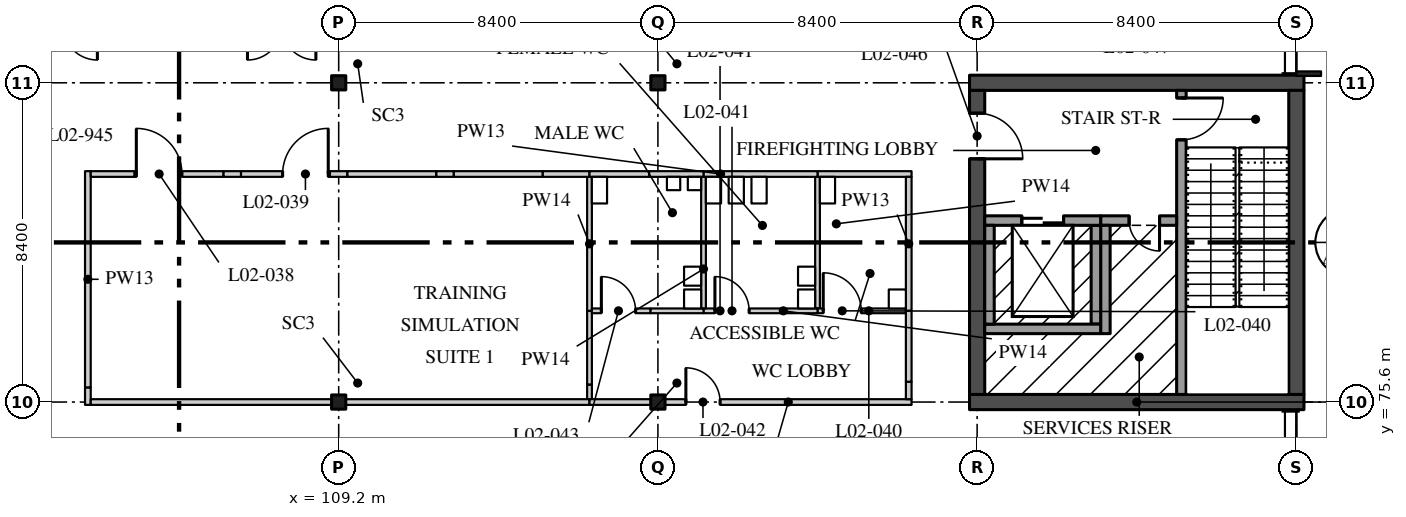
"""IFC4 building model, lengths in metres.
Left out: names, types, materials, properties, quantities, classifications, styles, units other than length and angle.
Written with IfcOpenShell. Run it as: python <this file> out.ifc"""

import sys

from ifc_helpers import new_model, si_unit, direction, frame, frame_2d, origin, origin_2d, place, context, subcontext, project, spatial, rectangle, i_section, extrude, element, fill, save


model = new_model("IFC4")
c1 = context("Model", 3, precision=1e-05, world=origin(), true_north=direction((0.0, 1.0)))
c2 = subcontext(c1, "Body", "Model", "MODEL_VIEW")
j1 = project(units=[si_unit("LENGTHUNIT", "METRE"), si_unit("PLANEANGLEUNIT", "RADIAN")], contexts=[c1])
p1 = place(None, origin())
s1 = spatial("IfcSite", under=j1, at=p1, CompositionType="ELEMENT")
p2 = place(p1, origin())
s2 = spatial("IfcBuilding", under=s1, at=p2, CompositionType="ELEMENT")
p3 = place(p2, frame((0.0, 0.0, 9.9)))
s3 = spatial("IfcBuildingStorey", under=s2, at=p3, CompositionType="ELEMENT", Elevation=9.9)
for number, where, z_axis, x_axis in (
    (1, (109.2, 75.6, 0.0), (0.0, 0.0, 1.0), (1.0, 0.0, 0.0)),
    (2, (109.2, 84.0, 0.0), (0.0, 0.0, 1.0), (1.0, 0.0, 0.0)),
    (3, (117.6, 75.6, 0.0), (0.0, 0.0, 1.0), (1.0, 0.0, 0.0)),
    (4, (117.6, 84.0, 0.0), (0.0, 0.0, 1.0), (1.0, 0.0, 0.0)),
):
    element("IfcColumn", number, at=place(p3, frame(where, z_axis=z_axis, x_axis=x_axis)), inside=s3, PredefinedType="COLUMN", context=c2, shape_type="SweptSolid", body=[
        extrude(i_section(OverallWidth=0.373, OverallDepth=0.373, WebThickness=0.016, FlangeThickness=0.026, FilletRadius=0.015, at=origin_2d()), origin(), (0.0, 0.0, 1.0), 4.37),
    ])
for number, where, z_axis, x_axis in (
    (5, (125.8, 75.6, 0.0), (0.0, 0.0, 1.0), (1.0, 0.0, 0.0)),
    (6, (125.8, 84.0, 0.0), (0.0, 0.0, 1.0), (1.0, 0.0, 0.0)),
):
    element("IfcWall", number, at=place(p3, frame(where, z_axis=z_axis, x_axis=x_axis)), inside=s3, PredefinedType="SHEAR", context=c2, shape_type="SweptSolid", body=[
        extrude(rectangle(XDim=8.8, YDim=0.4, at=frame_2d((4.4, 0.0))), origin(), (0.0, 0.0, 1.0), 4.37),
    ])
p4 = place(p3, frame((126.0, 75.8, 0.0), z_axis=(0.0, 0.0, 1.0), x_axis=(0.0, 1.0, 0.0)))
e7 = element("IfcWall", 7, at=p4, inside=s3, PredefinedType="SHEAR", context=c2, shape_type="SweptSolid", body=[
    extrude(rectangle(XDim=8.0, YDim=0.4, at=frame_2d((4.0, 0.0))), origin(), (0.0, 0.0, 1.0), 4.37),
])
p5 = place(p4, frame((6.2, 0.0, 0.0)))
e8 = element("IfcOpeningElement", 8, at=p5, cuts=e7, PredefinedType="OPENING", context=c2, shape_type="SweptSolid", body=[
    extrude(rectangle(XDim=1.2, YDim=2.1, at=frame_2d((0.6, 1.05))), frame((0.0, 0.21, 0.0), z_axis=(0.0, -1.0, 0.0), x_axis=(1.0, 0.0, 0.0)), (0.0, 0.0, 1.0), 0.42),
])
p6 = place(p3, frame((134.4, 75.8, 0.0), z_axis=(0.0, 0.0, 1.0), x_axis=(0.0, 1.0, 0.0)))
e9 = element("IfcWall", 9, at=p6, inside=s3, PredefinedType="SHEAR", context=c2, shape_type="SweptSolid", body=[
    extrude(rectangle(XDim=8.0, YDim=0.4, at=frame_2d((4.0, 0.0))), origin(), (0.0, 0.0, 1.0), 4.37),
])
p7 = place(p3, frame((131.375, 83.8, 0.0), z_axis=(0.0, 0.0, 1.0), x_axis=(0.0, -1.0, 0.0)))
e10 = element("IfcWall", 10, at=p7, inside=s3, PredefinedType="SOLIDWALL", context=c2, shape_type="SweptSolid", body=[
    extrude(rectangle(XDim=8.0, YDim=0.25, at=frame_2d((4.0, 0.0))), origin(), (0.0, 0.0, 1.0), 4.37),
])
p8 = place(p7, frame((0.2, 0.0, 0.0)))
e11 = element("IfcOpeningElement", 11, at=p8, cuts=e10, PredefinedType="OPENING", context=c2, shape_type="SweptSolid", body=[
    extrude(rectangle(XDim=1.1, YDim=2.1, at=frame_2d((0.55, 1.05))), frame((0.0, 0.135, 0.0), z_axis=(0.0, -1.0, 0.0), x_axis=(1.0, 0.0, 0.0)), (0.0, 0.0, 1.0), 0.27),
])
p9 = place(p3, frame((131.25, 80.375, 0.0), z_axis=(0.0, 0.0, 1.0), x_axis=(-1.0, 0.0, 0.0)))
e12 = element("IfcWall", 12, at=p9, inside=s3, PredefinedType="SOLIDWALL", context=c2, shape_type="SweptSolid", body=[
    extrude(rectangle(XDim=2.0, YDim=0.25, at=frame_2d((1.0, 0.0))), origin(), (0.0, 0.0, 1.0), 4.37),
])
p10 = place(p9, frame((0.45, 0.0, 0.0)))
e13 = element("IfcOpeningElement", 13, at=p10, cuts=e12, PredefinedType="OPENING", context=c2, shape_type="SweptSolid", body=[
    extrude(rectangle(XDim=0.8, YDim=2.1, at=frame_2d((0.4, 1.05))), frame((0.0, 0.135, 0.0), z_axis=(0.0, -1.0, 0.0), x_axis=(1.0, 0.0, 0.0)), (0.0, 0.0, 1.0), 0.27),
])
p11 = place(p3, frame((129.375, 80.25, 0.0), z_axis=(0.0, 0.0, 1.0), x_axis=(0.0, -1.0, 0.0)))
e14 = element("IfcWall", 14, at=p11, inside=s3, PredefinedType="SOLIDWALL", context=c2, shape_type="SweptSolid", body=[
    extrude(rectangle(XDim=2.85, YDim=0.25, at=frame_2d((1.425, 0.0))), origin(), (0.0, 0.0, 1.0), 4.37),
])
p12 = place(p3, frame((129.125, 77.65, 0.0), z_axis=(0.0, 0.0, 1.0), x_axis=(0.0, 1.0, 0.0)))
e15 = element("IfcWall", 15, at=p12, inside=s3, PredefinedType="SOLIDWALL", context=c2, shape_type="SweptSolid", body=[
    extrude(rectangle(XDim=2.6, YDim=0.25, at=frame_2d((1.3, 0.0))), origin(), (0.0, 0.0, 1.0), 4.37),
])
p13 = place(p3, frame((126.2, 80.375, 0.0), z_axis=(0.0, 0.0, 1.0), x_axis=(1.0, 0.0, 0.0)))
e16 = element("IfcWall", 16, at=p13, inside=s3, PredefinedType="SOLIDWALL", context=c2, shape_type="SweptSolid", body=[
    extrude(rectangle(XDim=3.05, YDim=0.25, at=frame_2d((1.525, 0.0))), origin(), (0.0, 0.0, 1.0), 4.37),
])
p14 = place(p13, frame((0.975, 0.0, 0.0)))
e17 = element("IfcOpeningElement", 17, at=p14, cuts=e16, PredefinedType="OPENING", context=c2, shape_type="SweptSolid", body=[
    extrude(rectangle(XDim=1.1, YDim=2.1, at=frame_2d((0.55, 1.05))), frame((0.0, 0.135, 0.0), z_axis=(0.0, -1.0, 0.0), x_axis=(1.0, 0.0, 0.0)), (0.0, 0.0, 1.0), 0.27),
])
p15 = place(p3, frame((126.2, 77.525, 0.0), z_axis=(0.0, 0.0, 1.0), x_axis=(1.0, 0.0, 0.0)))
e18 = element("IfcWall", 18, at=p15, inside=s3, PredefinedType="SOLIDWALL", context=c2, shape_type="SweptSolid", body=[
    extrude(rectangle(XDim=3.05, YDim=0.25, at=frame_2d((1.525, 0.0))), origin(), (0.0, 0.0, 1.0), 4.37),
])
p16 = place(p3, frame((126.325, 77.65, 0.0), z_axis=(0.0, 0.0, 1.0), x_axis=(0.0, 1.0, 0.0)))
e19 = element("IfcWall", 19, at=p16, inside=s3, PredefinedType="SOLIDWALL", context=c2, shape_type="SweptSolid", body=[
    extrude(rectangle(XDim=2.6, YDim=0.25, at=frame_2d((1.3, 0.0))), origin(), (0.0, 0.0, 1.0), 4.37),
])
p17 = place(p3, frame((115.8, 75.675, 0.0), z_axis=(0.0, 0.0, 1.0), x_axis=(0.0, 1.0, 0.0)))
e20 = element("IfcWall", 20, at=p17, inside=s3, PredefinedType="PARTITIONING", context=c2, shape_type="SweptSolid", body=[
    extrude(rectangle(XDim=0.385, YDim=0.125, at=frame_2d((0.192, 0.0))), origin(), (0.0, 0.0, 1.0), 3.746),
])
p18 = place(p3, frame((115.8, 76.06, 0.0), z_axis=(0.0, 0.0, 1.0), x_axis=(0.0, 1.0, 0.0)))
e21 = element("IfcWall", 21, at=p18, inside=s3, PredefinedType="PARTITIONING", context=c2, shape_type="SweptSolid", body=[
    extrude(rectangle(XDim=1.94, YDim=0.125, at=frame_2d((0.97, 0.0))), origin(), (0.0, 0.0, 1.0), 4.37),
])
p19 = place(p3, frame((115.8, 78.0, 0.0), z_axis=(0.0, 0.0, 1.0), x_axis=(0.0, 1.0, 0.0)))
e22 = element("IfcWall", 22, at=p19, inside=s3, PredefinedType="PARTITIONING", context=c2, shape_type="SweptSolid", body=[
    extrude(rectangle(XDim=3.525, YDim=0.125, at=frame_2d((1.762, 0.0))), origin(), (0.0, 0.0, 1.0), 4.37),
])
p20 = place(p3, frame((102.6, 75.525, 0.0), z_axis=(0.0, 0.0, 1.0), x_axis=(0.0, 1.0, 0.0)))
e23 = element("IfcWall", 23, at=p20, inside=s3, PredefinedType="PARTITIONING", context=c2, shape_type="SweptSolid", body=[
    extrude(rectangle(XDim=0.46, YDim=0.15, at=frame_2d((0.23, 0.0))), origin(), (0.0, 0.0, 1.0), 3.746),
])
p21 = place(p3, frame((102.6, 75.985, 0.0), z_axis=(0.0, 0.0, 1.0), x_axis=(0.0, 1.0, 0.0)))
e24 = element("IfcWall", 24, at=p21, inside=s3, PredefinedType="PARTITIONING", context=c2, shape_type="SweptSolid", body=[
    extrude(rectangle(XDim=5.69, YDim=0.15, at=frame_2d((2.845, 0.0))), origin(), (0.0, 0.0, 1.0), 4.37),
])
p22 = place(p3, frame((102.675, 75.6, 0.0), z_axis=(0.0, 0.0, 1.0), x_axis=(1.0, 0.0, 0.0)))
e25 = element("IfcWall", 25, at=p22, inside=s3, PredefinedType="PARTITIONING", context=c2, shape_type="SweptSolid", body=[
    extrude(rectangle(XDim=6.339, YDim=0.15, at=frame_2d((3.169, 0.0))), origin(), (0.0, 0.0, 1.0), 3.746),
])
p23 = place(p3, frame((109.386, 75.6, 0.0), z_axis=(0.0, 0.0, 1.0), x_axis=(1.0, 0.0, 0.0)))
e26 = element("IfcWall", 26, at=p23, inside=s3, PredefinedType="PARTITIONING", context=c2, shape_type="SweptSolid", body=[
    extrude(rectangle(XDim=6.414, YDim=0.15, at=frame_2d((3.207, 0.0))), origin(), (0.0, 0.0, 1.0), 3.746),
])
p24 = place(p3, frame((102.675, 81.6, 0.0), z_axis=(0.0, 0.0, 1.0), x_axis=(1.0, 0.0, 0.0)))
e27 = element("IfcWall", 27, at=p24, inside=s3, PredefinedType="PARTITIONING", context=c2, shape_type="SweptSolid", body=[
    extrude(rectangle(XDim=1.155, YDim=0.15, at=frame_2d((0.578, 0.0))), origin(), (0.0, 0.0, 1.0), 3.895),
])
p25 = place(p3, frame((103.83, 81.6, 0.0), z_axis=(0.0, 0.0, 1.0), x_axis=(1.0, 0.0, 0.0)))
e28 = element("IfcWall", 28, at=p25, inside=s3, PredefinedType="PARTITIONING", context=c2, shape_type="SweptSolid", body=[
    extrude(rectangle(XDim=2.34, YDim=0.15, at=frame_2d((1.17, 0.0))), origin(), (0.0, 0.0, 1.0), 4.37),
])
p26 = place(p25, frame((0.045, 0.0, 0.0)))
e29 = element("IfcOpeningElement", 29, at=p26, cuts=e28, PredefinedType="OPENING", context=c2, shape_type="SweptSolid", body=[
    extrude(rectangle(XDim=1.2, YDim=2.4, at=frame_2d((0.6, 1.2))), frame((0.0, 0.085, 0.0), z_axis=(0.0, -1.0, 0.0), x_axis=(1.0, 0.0, 0.0)), (0.0, 0.0, 1.0), 0.17),
])
p27 = place(p3, frame((106.17, 81.6, 0.0), z_axis=(0.0, 0.0, 1.0), x_axis=(1.0, 0.0, 0.0)))
e30 = element("IfcWall", 30, at=p27, inside=s3, PredefinedType="PARTITIONING", context=c2, shape_type="SweptSolid", body=[
    extrude(rectangle(XDim=0.46, YDim=0.15, at=frame_2d((0.23, 0.0))), origin(), (0.0, 0.0, 1.0), 3.895),
])
p28 = place(p3, frame((106.63, 81.6, 0.0), z_axis=(0.0, 0.0, 1.0), x_axis=(1.0, 0.0, 0.0)))
e31 = element("IfcWall", 31, at=p28, inside=s3, PredefinedType="PARTITIONING", context=c2, shape_type="SweptSolid", body=[
    extrude(rectangle(XDim=2.34, YDim=0.15, at=frame_2d((1.17, 0.0))), origin(), (0.0, 0.0, 1.0), 4.37),
])
p29 = place(p28, frame((1.095, 0.0, 0.0)))
e32 = element("IfcOpeningElement", 32, at=p29, cuts=e31, PredefinedType="OPENING", context=c2, shape_type="SweptSolid", body=[
    extrude(rectangle(XDim=1.2, YDim=2.4, at=frame_2d((0.6, 1.2))), frame((0.0, 0.085, 0.0), z_axis=(0.0, -1.0, 0.0), x_axis=(1.0, 0.0, 0.0)), (0.0, 0.0, 1.0), 0.17),
])
p30 = place(p3, frame((108.97, 81.6, 0.0), z_axis=(0.0, 0.0, 1.0), x_axis=(1.0, 0.0, 0.0)))
e33 = element("IfcWall", 33, at=p30, inside=s3, PredefinedType="PARTITIONING", context=c2, shape_type="SweptSolid", body=[
    extrude(rectangle(XDim=0.46, YDim=0.15, at=frame_2d((0.23, 0.0))), origin(), (0.0, 0.0, 1.0), 3.746),
])
p31 = place(p3, frame((109.43, 81.6, 0.0), z_axis=(0.0, 0.0, 1.0), x_axis=(1.0, 0.0, 0.0)))
e34 = element("IfcWall", 34, at=p31, inside=s3, PredefinedType="PARTITIONING", context=c2, shape_type="SweptSolid", body=[
    extrude(rectangle(XDim=2.34, YDim=0.15, at=frame_2d((1.17, 0.0))), origin(), (0.0, 0.0, 1.0), 4.37),
])
p32 = place(p3, frame((111.77, 81.6, 0.0), z_axis=(0.0, 0.0, 1.0), x_axis=(1.0, 0.0, 0.0)))
e35 = element("IfcWall", 35, at=p32, inside=s3, PredefinedType="PARTITIONING", context=c2, shape_type="SweptSolid", body=[
    extrude(rectangle(XDim=0.46, YDim=0.15, at=frame_2d((0.23, 0.0))), origin(), (0.0, 0.0, 1.0), 3.895),
])
p33 = place(p3, frame((112.23, 81.6, 0.0), z_axis=(0.0, 0.0, 1.0), x_axis=(1.0, 0.0, 0.0)))
e36 = element("IfcWall", 36, at=p33, inside=s3, PredefinedType="PARTITIONING", context=c2, shape_type="SweptSolid", body=[
    extrude(rectangle(XDim=2.34, YDim=0.15, at=frame_2d((1.17, 0.0))), origin(), (0.0, 0.0, 1.0), 4.37),
])
p34 = place(p3, frame((114.57, 81.6, 0.0), z_axis=(0.0, 0.0, 1.0), x_axis=(1.0, 0.0, 0.0)))
e37 = element("IfcWall", 37, at=p34, inside=s3, PredefinedType="PARTITIONING", context=c2, shape_type="SweptSolid", body=[
    extrude(rectangle(XDim=1.23, YDim=0.15, at=frame_2d((0.615, 0.0))), origin(), (0.0, 0.0, 1.0), 3.895),
])
p35 = place(p3, frame((121.8, 78.062, 0.0), z_axis=(0.0, 0.0, 1.0), x_axis=(0.0, 1.0, 0.0)))
e38 = element("IfcWall", 38, at=p35, inside=s3, PredefinedType="PARTITIONING", context=c2, shape_type="SweptSolid", body=[
    extrude(rectangle(XDim=3.463, YDim=0.125, at=frame_2d((1.731, 0.0))), origin(), (0.0, 0.0, 1.0), 4.37),
])
p36 = place(p3, frame((121.8, 78.0, 0.0), z_axis=(0.0, 0.0, 1.0), x_axis=(1.0, 0.0, 0.0)))
e39 = element("IfcWall", 39, at=p36, inside=s3, PredefinedType="PARTITIONING", context=c2, shape_type="SweptSolid", body=[
    extrude(rectangle(XDim=2.325, YDim=0.125, at=frame_2d((1.163, 0.0))), origin(), (0.0, 0.0, 1.0), 3.895),
])
p37 = place(p36, frame((0.15, 0.0, 0.0)))
e40 = element("IfcOpeningElement", 40, at=p37, cuts=e39, PredefinedType="OPENING", context=c2, shape_type="SweptSolid", body=[
    extrude(rectangle(XDim=1.0, YDim=2.1, at=frame_2d((0.5, 1.05))), frame((0.0, 0.073, 0.0), z_axis=(0.0, -1.0, 0.0), x_axis=(1.0, 0.0, 0.0)), (0.0, 0.0, 1.0), 0.145),
])
p38 = place(p3, frame((121.8, 81.6, 0.0), z_axis=(0.0, 0.0, 1.0), x_axis=(1.0, 0.0, 0.0)))
e41 = element("IfcWall", 41, at=p38, inside=s3, PredefinedType="PARTITIONING", context=c2, shape_type="SweptSolid", body=[
    extrude(rectangle(XDim=2.475, YDim=0.15, at=frame_2d((1.237, 0.0))), origin(), (0.0, 0.0, 1.0), 3.895),
])
p39 = place(p3, frame((124.2, 78.0, 0.0), z_axis=(0.0, 0.0, 1.0), x_axis=(0.0, 1.0, 0.0)))
e42 = element("IfcWall", 42, at=p39, inside=s3, PredefinedType="PARTITIONING", context=c2, shape_type="SweptSolid", body=[
    extrude(rectangle(XDim=3.525, YDim=0.15, at=frame_2d((1.762, 0.0))), origin(), (0.0, 0.0, 1.0), 4.37),
])
p40 = place(p3, frame((118.8, 78.0, 0.0), z_axis=(0.0, 0.0, 1.0), x_axis=(1.0, 0.0, 0.0)))
e43 = element("IfcWall", 43, at=p40, inside=s3, PredefinedType="PARTITIONING", context=c2, shape_type="SweptSolid", body=[
    extrude(rectangle(XDim=3.0, YDim=0.125, at=frame_2d((1.5, 0.0))), origin(), (0.0, 0.0, 1.0), 3.895),
])
p41 = place(p40, frame((0.3, 0.0, 0.0)))
e44 = element("IfcOpeningElement", 44, at=p41, cuts=e43, PredefinedType="OPENING", context=c2, shape_type="SweptSolid", body=[
    extrude(rectangle(XDim=0.9, YDim=2.1, at=frame_2d((0.45, 1.05))), frame((0.0, 0.073, 0.0), z_axis=(0.0, -1.0, 0.0), x_axis=(1.0, 0.0, 0.0)), (0.0, 0.0, 1.0), 0.145),
])
p42 = place(p3, frame((118.8, 78.062, 0.0), z_axis=(0.0, 0.0, 1.0), x_axis=(0.0, 1.0, 0.0)))
e45 = element("IfcWall", 45, at=p42, inside=s3, PredefinedType="PARTITIONING", context=c2, shape_type="SweptSolid", body=[
    extrude(rectangle(XDim=3.463, YDim=0.125, at=frame_2d((1.731, 0.0))), origin(), (0.0, 0.0, 1.0), 4.37),
])
p43 = place(p3, frame((118.8, 81.6, 0.0), z_axis=(0.0, 0.0, 1.0), x_axis=(1.0, 0.0, 0.0)))
e46 = element("IfcWall", 46, at=p43, inside=s3, PredefinedType="PARTITIONING", context=c2, shape_type="SweptSolid", body=[
    extrude(rectangle(XDim=3.0, YDim=0.15, at=frame_2d((1.5, 0.0))), origin(), (0.0, 0.0, 1.0), 3.895),
])
p44 = place(p3, frame((115.862, 78.0, 0.0), z_axis=(0.0, 0.0, 1.0), x_axis=(1.0, 0.0, 0.0)))
e47 = element("IfcWall", 47, at=p44, inside=s3, PredefinedType="PARTITIONING", context=c2, shape_type="SweptSolid", body=[
    extrude(rectangle(XDim=1.545, YDim=0.125, at=frame_2d((0.772, 0.0))), origin(), (0.0, 0.0, 1.0), 4.37),
])
p45 = place(p44, frame((0.25, 0.0, 0.0)))
e48 = element("IfcOpeningElement", 48, at=p45, cuts=e47, PredefinedType="OPENING", context=c2, shape_type="SweptSolid", body=[
    extrude(rectangle(XDim=0.9, YDim=2.1, at=frame_2d((0.45, 1.05))), frame((0.0, 0.073, 0.0), z_axis=(0.0, -1.0, 0.0), x_axis=(1.0, 0.0, 0.0)), (0.0, 0.0, 1.0), 0.145),
])
p46 = place(p3, frame((117.407, 78.0, 0.0), z_axis=(0.0, 0.0, 1.0), x_axis=(1.0, 0.0, 0.0)))
e49 = element("IfcWall", 49, at=p46, inside=s3, PredefinedType="PARTITIONING", context=c2, shape_type="SweptSolid", body=[
    extrude(rectangle(XDim=1.393, YDim=0.125, at=frame_2d((0.697, 0.0))), origin(), (0.0, 0.0, 1.0), 3.746),
])
p47 = place(p3, frame((115.8, 75.6, 0.0), z_axis=(0.0, 0.0, 1.0), x_axis=(1.0, 0.0, 0.0)))
e50 = element("IfcWall", 50, at=p47, inside=s3, PredefinedType="PARTITIONING", context=c2, shape_type="SweptSolid", body=[
    extrude(rectangle(XDim=1.613, YDim=0.15, at=frame_2d((0.807, 0.0))), origin(), (0.0, 0.0, 1.0), 3.746),
])
p48 = place(p3, frame((117.786, 75.6, 0.0), z_axis=(0.0, 0.0, 1.0), x_axis=(1.0, 0.0, 0.0)))
e51 = element("IfcWall", 51, at=p48, inside=s3, PredefinedType="PARTITIONING", context=c2, shape_type="SweptSolid", body=[
    extrude(rectangle(XDim=6.489, YDim=0.15, at=frame_2d((3.245, 0.0))), origin(), (0.0, 0.0, 1.0), 3.746),
])
p49 = place(p48, frame((0.55, 0.0, 0.0)))
e52 = element("IfcOpeningElement", 52, at=p49, cuts=e51, PredefinedType="OPENING", context=c2, shape_type="SweptSolid", body=[
    extrude(rectangle(XDim=0.9, YDim=2.1, at=frame_2d((0.45, 1.05))), frame((0.0, 0.085, 0.0), z_axis=(0.0, -1.0, 0.0), x_axis=(1.0, 0.0, 0.0)), (0.0, 0.0, 1.0), 0.17),
])
p50 = place(p3, frame((124.2, 75.675, 0.0), z_axis=(0.0, 0.0, 1.0), x_axis=(0.0, 1.0, 0.0)))
e53 = element("IfcWall", 53, at=p50, inside=s3, PredefinedType="PARTITIONING", context=c2, shape_type="SweptSolid", body=[
    extrude(rectangle(XDim=0.46, YDim=0.15, at=frame_2d((0.23, 0.0))), origin(), (0.0, 0.0, 1.0), 3.746),
])
p51 = place(p3, frame((124.2, 76.135, 0.0), z_axis=(0.0, 0.0, 1.0), x_axis=(0.0, 1.0, 0.0)))
e54 = element("IfcWall", 54, at=p51, inside=s3, PredefinedType="PARTITIONING", context=c2, shape_type="SweptSolid", body=[
    extrude(rectangle(XDim=1.865, YDim=0.15, at=frame_2d((0.933, 0.0))), origin(), (0.0, 0.0, 1.0), 4.37),
])
p52 = place(p3, frame((115.8, 81.6, 0.0), z_axis=(0.0, 0.0, 1.0), x_axis=(1.0, 0.0, 0.0)))
e55 = element("IfcWall", 55, at=p52, inside=s3, PredefinedType="PARTITIONING", context=c2, shape_type="SweptSolid", body=[
    extrude(rectangle(XDim=1.57, YDim=0.15, at=frame_2d((0.785, 0.0))), origin(), (0.0, 0.0, 1.0), 4.37),
])
p53 = place(p3, frame((117.37, 81.6, 0.0), z_axis=(0.0, 0.0, 1.0), x_axis=(1.0, 0.0, 0.0)))
e56 = element("IfcWall", 56, at=p53, inside=s3, PredefinedType="PARTITIONING", context=c2, shape_type="SweptSolid", body=[
    extrude(rectangle(XDim=1.43, YDim=0.15, at=frame_2d((0.715, 0.0))), origin(), (0.0, 0.0, 1.0), 3.746),
])
p54 = place(p5, frame((1.2, 0.0, 0.0), z_axis=(0.0, 0.0, 1.0), x_axis=(-1.0, 0.0, 0.0)))
e57 = element("IfcDoor", 57, at=p54, inside=s3, OperationType="SINGLE_SWING_LEFT", PredefinedType="DOOR", context=c2, shape_type="SweptSolid", body=[
    extrude(rectangle(XDim=1.2, YDim=2.1, at=frame_2d((0.6, 1.05))), frame((0.0, 0.035, 0.0), z_axis=(0.0, -1.0, 0.0), x_axis=(1.0, 0.0, 0.0)), (0.0, 0.0, 1.0), 0.07),
])
fill(e8, e57)
p55 = place(p10, origin())
e58 = element("IfcDoor", 58, at=p55, inside=s3, OperationType="SINGLE_SWING_RIGHT", PredefinedType="DOOR", context=c2, shape_type="SweptSolid", body=[
    extrude(rectangle(XDim=0.8, YDim=2.1, at=frame_2d((0.4, 1.05))), frame((0.0, 0.035, 0.0), z_axis=(0.0, -1.0, 0.0), x_axis=(1.0, 0.0, 0.0)), (0.0, 0.0, 1.0), 0.07),
])
fill(e13, e58)
p56 = place(p8, origin())
e59 = element("IfcDoor", 59, at=p56, inside=s3, OperationType="SINGLE_SWING_RIGHT", PredefinedType="DOOR", context=c2, shape_type="SweptSolid", body=[
    extrude(rectangle(XDim=1.1, YDim=2.1, at=frame_2d((0.55, 1.05))), frame((0.0, 0.035, 0.0), z_axis=(0.0, -1.0, 0.0), x_axis=(1.0, 0.0, 0.0)), (0.0, 0.0, 1.0), 0.07),
])
fill(e11, e59)
p57 = place(p14, origin())
e60 = element("IfcDoor", 60, at=p57, inside=s3, OperationType="DOUBLE_DOOR_SLIDING", PredefinedType="DOOR", context=c2, shape_type="SweptSolid", body=[
    extrude(rectangle(XDim=1.1, YDim=2.1, at=frame_2d((0.55, 1.05))), frame((0.0, 0.04, 0.0), z_axis=(0.0, -1.0, 0.0), x_axis=(1.0, 0.0, 0.0)), (0.0, 0.0, 1.0), 0.08),
])
fill(e17, e60)
p58 = place(p26, origin())
e61 = element("IfcDoor", 61, at=p58, inside=s3, OperationType="SINGLE_SWING_RIGHT", PredefinedType="DOOR", context=c2, shape_type="SweptSolid", body=[
    extrude(rectangle(XDim=1.2, YDim=2.4, at=frame_2d((0.6, 1.2))), frame((0.0, 0.025, 0.0), z_axis=(0.0, -1.0, 0.0), x_axis=(1.0, 0.0, 0.0)), (0.0, 0.0, 1.0), 0.05),
])
fill(e29, e61)
p59 = place(p29, origin())
e62 = element("IfcDoor", 62, at=p59, inside=s3, OperationType="SINGLE_SWING_LEFT", PredefinedType="DOOR", context=c2, shape_type="SweptSolid", body=[
    extrude(rectangle(XDim=1.2, YDim=2.4, at=frame_2d((0.6, 1.2))), frame((0.0, 0.025, 0.0), z_axis=(0.0, -1.0, 0.0), x_axis=(1.0, 0.0, 0.0)), (0.0, 0.0, 1.0), 0.05),
])
fill(e32, e62)
p60 = place(p37, origin())
e63 = element("IfcDoor", 63, at=p60, inside=s3, OperationType="SINGLE_SWING_RIGHT", PredefinedType="DOOR", context=c2, shape_type="SweptSolid", body=[
    extrude(rectangle(XDim=1.0, YDim=2.1, at=frame_2d((0.5, 1.05))), frame((0.0, 0.02, 0.0), z_axis=(0.0, -1.0, 0.0), x_axis=(1.0, 0.0, 0.0)), (0.0, 0.0, 1.0), 0.04),
])
fill(e40, e63)
p61 = place(p41, origin())
e64 = element("IfcDoor", 64, at=p61, inside=s3, OperationType="SINGLE_SWING_RIGHT", PredefinedType="DOOR", context=c2, shape_type="SweptSolid", body=[
    extrude(rectangle(XDim=0.9, YDim=2.1, at=frame_2d((0.45, 1.05))), frame((0.0, 0.02, 0.0), z_axis=(0.0, -1.0, 0.0), x_axis=(1.0, 0.0, 0.0)), (0.0, 0.0, 1.0), 0.04),
])
fill(e44, e64)
p62 = place(p49, origin())
e65 = element("IfcDoor", 65, at=p62, inside=s3, OperationType="SINGLE_SWING_RIGHT", PredefinedType="DOOR", context=c2, shape_type="SweptSolid", body=[
    extrude(rectangle(XDim=0.9, YDim=2.1, at=frame_2d((0.45, 1.05))), frame((0.0, 0.025, 0.0), z_axis=(0.0, -1.0, 0.0), x_axis=(1.0, 0.0, 0.0)), (0.0, 0.0, 1.0), 0.05),
])
fill(e52, e65)
p63 = place(p45, origin())
e66 = element("IfcDoor", 66, at=p63, inside=s3, OperationType="SINGLE_SWING_RIGHT", PredefinedType="DOOR", context=c2, shape_type="SweptSolid", body=[
    extrude(rectangle(XDim=0.9, YDim=2.1, at=frame_2d((0.45, 1.05))), frame((0.0, 0.02, 0.0), z_axis=(0.0, -1.0, 0.0), x_axis=(1.0, 0.0, 0.0)), (0.0, 0.0, 1.0), 0.04),
])
fill(e48, e66)
save(model, sys.argv[1])
